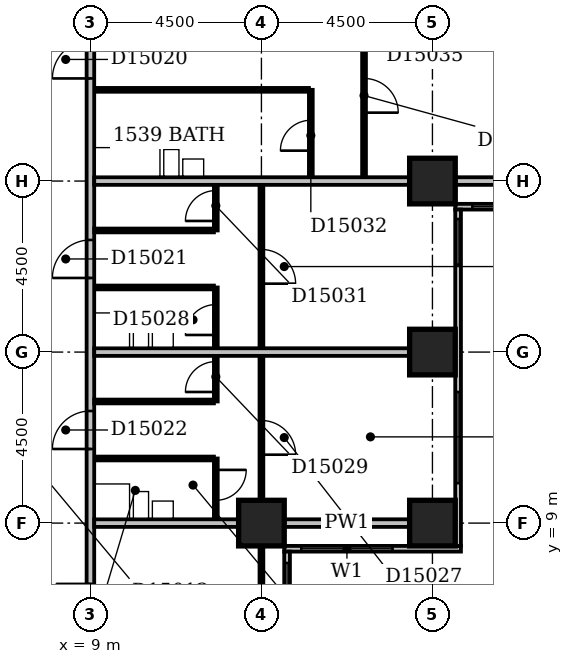
"""IFC4 building model, lengths in metres.
Left out: names, types, materials, properties, quantities, classifications, styles, units other than length and angle.
Written with IfcOpenShell. Run it as: python <this file> out.ifc"""

import sys

from ifc_helpers import new_model, si_unit, direction, frame, frame_2d, origin, origin_2d, place, context, subcontext, project, spatial, rectangle, extrude, element, fill, save


model = new_model("IFC4")
c1 = context("Model", 3, precision=1e-05, world=origin(), true_north=direction((0.0, 1.0)))
c2 = subcontext(c1, "Body", "Model", "MODEL_VIEW")
j1 = project(units=[si_unit("LENGTHUNIT", "METRE"), si_unit("PLANEANGLEUNIT", "RADIAN")], contexts=[c1])
p1 = place(None, origin())
s1 = spatial("IfcSite", under=j1, at=p1, CompositionType="ELEMENT")
p2 = place(p1, origin())
s2 = spatial("IfcBuilding", under=s1, at=p2, CompositionType="ELEMENT")
p3 = place(p2, frame((0.0, 0.0, 65.0)))
s3 = spatial("IfcBuildingStorey", under=s2, at=p3, CompositionType="ELEMENT", Elevation=65.0)
for number, where, z_axis, x_axis in (
    (1, (13.5, 9.0, -0.3), (0.0, 0.0, 1.0), (1.0, 0.0, 0.0)),
    (2, (18.0, 9.0, -0.3), (0.0, 0.0, 1.0), (1.0, 0.0, 0.0)),
    (3, (18.0, 13.5, -0.3), (0.0, 0.0, 1.0), (1.0, 0.0, 0.0)),
    (4, (18.0, 18.0, -0.3), (0.0, 0.0, 1.0), (1.0, 0.0, 0.0)),
):
    element("IfcColumn", number, at=place(p3, frame(where, z_axis=z_axis, x_axis=x_axis)), inside=s3, PredefinedType="COLUMN", context=c2, shape_type="SweptSolid", body=[
        extrude(rectangle(XDim=1.2, YDim=1.2, at=origin_2d()), origin(), (0.0, 0.0, 1.0), 3.6),
    ])
p4 = place(p3, frame((14.175, 3.9, 0.0), z_axis=(0.0, 0.0, 1.0), x_axis=(0.0, 1.0, 0.0)))
e5 = element("IfcWall", 5, at=p4, inside=s3, PredefinedType="STANDARD", context=c2, shape_type="SweptSolid", body=[
    extrude(rectangle(XDim=4.35, YDim=0.15, at=frame_2d((2.175, 0.0))), origin(), (0.0, 0.0, 1.0), 2.7),
])
p5 = place(p4, frame((1.65, 0.0, 0.6)))
e6 = element("IfcOpeningElement", 6, at=p5, cuts=e5, PredefinedType="OPENING", context=c2, shape_type="SweptSolid", body=[
    extrude(rectangle(XDim=2.4, YDim=1.8, at=frame_2d((1.2, 0.9))), frame((0.0, 0.087, 0.0), z_axis=(0.0, -1.0, 0.0), x_axis=(1.0, 0.0, 0.0)), (0.0, 0.0, 1.0), 0.174),
])
p6 = place(p3, frame((14.1, 8.325, 0.0), z_axis=(0.0, 0.0, 1.0), x_axis=(1.0, 0.0, 0.0)))
e7 = element("IfcWall", 7, at=p6, inside=s3, PredefinedType="STANDARD", context=c2, shape_type="SweptSolid", body=[
    extrude(rectangle(XDim=4.65, YDim=0.15, at=frame_2d((2.325, 0.0))), origin(), (0.0, 0.0, 1.0), 2.7),
])
p7 = place(p6, frame((0.45, 0.0, 0.6)))
e8 = element("IfcOpeningElement", 8, at=p7, cuts=e7, PredefinedType="OPENING", context=c2, shape_type="SweptSolid", body=[
    extrude(rectangle(XDim=2.4, YDim=1.8, at=frame_2d((1.2, 0.9))), frame((0.0, 0.087, 0.0), z_axis=(0.0, -1.0, 0.0), x_axis=(1.0, 0.0, 0.0)), (0.0, 0.0, 1.0), 0.174),
])
p8 = place(p3, frame((18.675, 8.4, 0.0), z_axis=(0.0, 0.0, 1.0), x_axis=(0.0, 1.0, 0.0)))
e9 = element("IfcWall", 9, at=p8, inside=s3, PredefinedType="STANDARD", context=c2, shape_type="SweptSolid", body=[
    extrude(rectangle(XDim=8.85, YDim=0.15, at=frame_2d((4.425, 0.0))), origin(), (0.0, 0.0, 1.0), 2.7),
])
p9 = place(p8, frame((1.65, 0.0, 0.6)))
e10 = element("IfcOpeningElement", 10, at=p9, cuts=e9, PredefinedType="OPENING", context=c2, shape_type="SweptSolid", body=[
    extrude(rectangle(XDim=2.4, YDim=1.8, at=frame_2d((1.2, 0.9))), frame((0.0, 0.087, 0.0), z_axis=(0.0, -1.0, 0.0), x_axis=(1.0, 0.0, 0.0)), (0.0, 0.0, 1.0), 0.174),
])
p10 = place(p8, frame((7.401, 0.0, 0.6)))
e11 = element("IfcOpeningElement", 11, at=p10, cuts=e9, PredefinedType="OPENING", context=c2, shape_type="SweptSolid", body=[
    extrude(rectangle(XDim=1.2, YDim=1.8, at=frame_2d((0.6, 0.9))), frame((0.0, 0.087, 0.0), z_axis=(0.0, -1.0, 0.0), x_axis=(1.0, 0.0, 0.0)), (0.0, 0.0, 1.0), 0.174),
])
p11 = place(p3, frame((18.6, 17.325, 0.0), z_axis=(0.0, 0.0, 1.0), x_axis=(1.0, 0.0, 0.0)))
e12 = element("IfcWall", 12, at=p11, inside=s3, PredefinedType="STANDARD", context=c2, shape_type="SweptSolid", body=[
    extrude(rectangle(XDim=4.65, YDim=0.15, at=frame_2d((2.325, 0.0))), origin(), (0.0, 0.0, 1.0), 2.7),
])
p12 = place(p11, frame((0.45, 0.0, 0.6)))
e13 = element("IfcOpeningElement", 13, at=p12, cuts=e12, PredefinedType="OPENING", context=c2, shape_type="SweptSolid", body=[
    extrude(rectangle(XDim=2.4, YDim=1.8, at=frame_2d((1.2, 0.9))), frame((0.0, 0.087, 0.0), z_axis=(0.0, -1.0, 0.0), x_axis=(1.0, 0.0, 0.0)), (0.0, 0.0, 1.0), 0.174),
])
p13 = place(p3, frame((9.0, 5.0, 0.0), z_axis=(0.0, 0.0, 1.0), x_axis=(0.0, 1.0, 0.0)))
e14 = element("IfcWall", 14, at=p13, inside=s3, PredefinedType="PARTITIONING", context=c2, shape_type="SweptSolid", body=[
    extrude(rectangle(XDim=44.5, YDim=0.2, at=frame_2d((22.25, 0.0))), origin(), (0.0, 0.0, 1.0), 3.3),
])
p14 = place(p13, frame((22.3, 0.0, 0.0)))
e15 = element("IfcOpeningElement", 15, at=p14, cuts=e14, PredefinedType="OPENING", context=c2, shape_type="SweptSolid", body=[
    extrude(rectangle(XDim=1.0, YDim=2.1, at=frame_2d((0.5, 1.05))), frame((0.0, 0.112, 0.0), z_axis=(0.0, -1.0, 0.0), x_axis=(1.0, 0.0, 0.0)), (0.0, 0.0, 1.0), 0.224),
])
p15 = place(p13, frame((15.7, 0.0, 0.0)))
e16 = element("IfcOpeningElement", 16, at=p15, cuts=e14, PredefinedType="OPENING", context=c2, shape_type="SweptSolid", body=[
    extrude(rectangle(XDim=1.0, YDim=2.1, at=frame_2d((0.5, 1.05))), frame((0.0, 0.112, 0.0), z_axis=(0.0, -1.0, 0.0), x_axis=(1.0, 0.0, 0.0)), (0.0, 0.0, 1.0), 0.224),
])
p16 = place(p13, frame((10.45, 0.0, 0.0)))
e17 = element("IfcOpeningElement", 17, at=p16, cuts=e14, PredefinedType="OPENING", context=c2, shape_type="SweptSolid", body=[
    extrude(rectangle(XDim=1.0, YDim=2.1, at=frame_2d((0.5, 1.05))), frame((0.0, 0.112, 0.0), z_axis=(0.0, -1.0, 0.0), x_axis=(1.0, 0.0, 0.0)), (0.0, 0.0, 1.0), 0.224),
])
p17 = place(p13, frame((5.95, 0.0, 0.0)))
e18 = element("IfcOpeningElement", 18, at=p17, cuts=e14, PredefinedType="OPENING", context=c2, shape_type="SweptSolid", body=[
    extrude(rectangle(XDim=1.0, YDim=2.1, at=frame_2d((0.5, 1.05))), frame((0.0, 0.112, 0.0), z_axis=(0.0, -1.0, 0.0), x_axis=(1.0, 0.0, 0.0)), (0.0, 0.0, 1.0), 0.224),
])
p18 = place(p13, frame((37.25, 0.0, 0.0)))
e19 = element("IfcOpeningElement", 19, at=p18, cuts=e14, PredefinedType="OPENING", context=c2, shape_type="SweptSolid", body=[
    extrude(rectangle(XDim=0.9, YDim=2.1, at=frame_2d((0.45, 1.05))), frame((0.0, 0.112, 0.0), z_axis=(0.0, -1.0, 0.0), x_axis=(1.0, 0.0, 0.0)), (0.0, 0.0, 1.0), 0.224),
])
p19 = place(p13, frame((1.5, 0.0, 0.0)))
e20 = element("IfcOpeningElement", 20, at=p19, cuts=e14, PredefinedType="OPENING", context=c2, shape_type="SweptSolid", body=[
    extrude(rectangle(XDim=0.9, YDim=2.1, at=frame_2d((0.45, 1.05))), frame((0.0, 0.112, 0.0), z_axis=(0.0, -1.0, 0.0), x_axis=(1.0, 0.0, 0.0)), (0.0, 0.0, 1.0), 0.224),
])
p20 = place(p3, frame((13.5, 5.1, 0.0), z_axis=(0.0, 0.0, 1.0), x_axis=(0.0, 1.0, 0.0)))
e21 = element("IfcWall", 21, at=p20, inside=s3, PredefinedType="PARTITIONING", context=c2, shape_type="SweptSolid", body=[
    extrude(rectangle(XDim=3.3, YDim=0.1, at=frame_2d((1.65, 0.0))), origin(), (0.0, 0.0, 1.0), 2.7),
])
p21 = place(p3, frame((9.1, 9.0, 0.0), z_axis=(0.0, 0.0, 1.0), x_axis=(1.0, 0.0, 0.0)))
e22 = element("IfcWall", 22, at=p21, inside=s3, PredefinedType="PARTITIONING", context=c2, shape_type="SweptSolid", body=[
    extrude(rectangle(XDim=3.8, YDim=0.2, at=frame_2d((1.9, 0.0))), origin(), (0.0, 0.0, 1.0), 3.3),
])
p22 = place(p3, frame((14.1, 9.0, 0.0), z_axis=(0.0, 0.0, 1.0), x_axis=(1.0, 0.0, 0.0)))
e23 = element("IfcWall", 23, at=p22, inside=s3, PredefinedType="PARTITIONING", context=c2, shape_type="SweptSolid", body=[
    extrude(rectangle(XDim=3.3, YDim=0.2, at=frame_2d((1.65, 0.0))), origin(), (0.0, 0.0, 1.0), 2.7),
])
p23 = place(p3, frame((12.3, 9.1, 0.0), z_axis=(0.0, 0.0, 1.0), x_axis=(0.0, 1.0, 0.0)))
e24 = element("IfcWall", 24, at=p23, inside=s3, PredefinedType="PARTITIONING", context=c2, shape_type="SweptSolid", body=[
    extrude(rectangle(XDim=1.6, YDim=0.1, at=frame_2d((0.8, 0.0))), origin(), (0.0, 0.0, 1.0), 3.3),
])
p24 = place(p23, frame((0.5, 0.0, 0.0)))
e25 = element("IfcOpeningElement", 25, at=p24, cuts=e24, PredefinedType="OPENING", context=c2, shape_type="SweptSolid", body=[
    extrude(rectangle(XDim=0.8, YDim=2.1, at=frame_2d((0.4, 1.05))), frame((0.0, 0.062, 0.0), z_axis=(0.0, -1.0, 0.0), x_axis=(1.0, 0.0, 0.0)), (0.0, 0.0, 1.0), 0.124),
])
p25 = place(p3, frame((13.5, 9.6, 0.0), z_axis=(0.0, 0.0, 1.0), x_axis=(0.0, 1.0, 0.0)))
e26 = element("IfcWall", 26, at=p25, inside=s3, PredefinedType="PARTITIONING", context=c2, shape_type="SweptSolid", body=[
    extrude(rectangle(XDim=8.3, YDim=0.1, at=frame_2d((4.15, 0.0))), origin(), (0.0, 0.0, 1.0), 3.3),
])
p26 = place(p25, frame((5.7, 0.0, 0.0)))
e27 = element("IfcOpeningElement", 27, at=p26, cuts=e26, PredefinedType="OPENING", context=c2, shape_type="SweptSolid", body=[
    extrude(rectangle(XDim=0.9, YDim=2.1, at=frame_2d((0.45, 1.05))), frame((0.0, 0.062, 0.0), z_axis=(0.0, -1.0, 0.0), x_axis=(1.0, 0.0, 0.0)), (0.0, 0.0, 1.0), 0.124),
])
p27 = place(p25, frame((1.2, 0.0, 0.0)))
e28 = element("IfcOpeningElement", 28, at=p27, cuts=e26, PredefinedType="OPENING", context=c2, shape_type="SweptSolid", body=[
    extrude(rectangle(XDim=0.9, YDim=2.1, at=frame_2d((0.45, 1.05))), frame((0.0, 0.062, 0.0), z_axis=(0.0, -1.0, 0.0), x_axis=(1.0, 0.0, 0.0)), (0.0, 0.0, 1.0), 0.124),
])
p28 = place(p3, frame((9.1, 10.7, 0.0), z_axis=(0.0, 0.0, 1.0), x_axis=(1.0, 0.0, 0.0)))
e29 = element("IfcWall", 29, at=p28, inside=s3, PredefinedType="PLUMBINGWALL", context=c2, shape_type="SweptSolid", body=[
    extrude(rectangle(XDim=3.15, YDim=0.1, at=frame_2d((1.575, 0.0))), origin(), (0.0, 0.0, 1.0), 3.3),
])
p29 = place(p3, frame((9.1, 12.2, 0.0), z_axis=(0.0, 0.0, 1.0), x_axis=(1.0, 0.0, 0.0)))
e30 = element("IfcWall", 30, at=p29, inside=s3, PredefinedType="PARTITIONING", context=c2, shape_type="SweptSolid", body=[
    extrude(rectangle(XDim=3.15, YDim=0.1, at=frame_2d((1.575, 0.0))), origin(), (0.0, 0.0, 1.0), 3.3),
])
p30 = place(p3, frame((12.3, 12.2, 0.0), z_axis=(0.0, 0.0, 1.0), x_axis=(0.0, 1.0, 0.0)))
e31 = element("IfcWall", 31, at=p30, inside=s3, PredefinedType="PARTITIONING", context=c2, shape_type="SweptSolid", body=[
    extrude(rectangle(XDim=3.0, YDim=0.1, at=frame_2d((1.5, 0.0))), origin(), (0.0, 0.0, 1.0), 3.3),
])
p31 = place(p30, frame((1.75, 0.0, 0.0)))
e32 = element("IfcOpeningElement", 32, at=p31, cuts=e31, PredefinedType="OPENING", context=c2, shape_type="SweptSolid", body=[
    extrude(rectangle(XDim=0.8, YDim=2.1, at=frame_2d((0.4, 1.05))), frame((0.0, 0.062, 0.0), z_axis=(0.0, -1.0, 0.0), x_axis=(1.0, 0.0, 0.0)), (0.0, 0.0, 1.0), 0.124),
])
p32 = place(p30, frame((0.25, 0.0, 0.0)))
e33 = element("IfcOpeningElement", 33, at=p32, cuts=e31, PredefinedType="OPENING", context=c2, shape_type="SweptSolid", body=[
    extrude(rectangle(XDim=0.8, YDim=2.1, at=frame_2d((0.4, 1.05))), frame((0.0, 0.062, 0.0), z_axis=(0.0, -1.0, 0.0), x_axis=(1.0, 0.0, 0.0)), (0.0, 0.0, 1.0), 0.124),
])
p33 = place(p3, frame((9.1, 13.5, 0.0), z_axis=(0.0, 0.0, 1.0), x_axis=(1.0, 0.0, 0.0)))
e34 = element("IfcWall", 34, at=p33, inside=s3, PredefinedType="PARTITIONING", context=c2, shape_type="SweptSolid", body=[
    extrude(rectangle(XDim=8.3, YDim=0.2, at=frame_2d((4.15, 0.0))), origin(), (0.0, 0.0, 1.0), 3.3),
])
p34 = place(p3, frame((9.1, 15.2, 0.0), z_axis=(0.0, 0.0, 1.0), x_axis=(1.0, 0.0, 0.0)))
e35 = element("IfcWall", 35, at=p34, inside=s3, PredefinedType="PLUMBINGWALL", context=c2, shape_type="SweptSolid", body=[
    extrude(rectangle(XDim=3.15, YDim=0.1, at=frame_2d((1.575, 0.0))), origin(), (0.0, 0.0, 1.0), 3.3),
])
p35 = place(p3, frame((9.1, 16.7, 0.0), z_axis=(0.0, 0.0, 1.0), x_axis=(1.0, 0.0, 0.0)))
e36 = element("IfcWall", 36, at=p35, inside=s3, PredefinedType="PARTITIONING", context=c2, shape_type="SweptSolid", body=[
    extrude(rectangle(XDim=3.15, YDim=0.1, at=frame_2d((1.575, 0.0))), origin(), (0.0, 0.0, 1.0), 3.3),
])
p36 = place(p3, frame((12.3, 16.7, 0.0), z_axis=(0.0, 0.0, 1.0), x_axis=(0.0, 1.0, 0.0)))
e37 = element("IfcWall", 37, at=p36, inside=s3, PredefinedType="PARTITIONING", context=c2, shape_type="SweptSolid", body=[
    extrude(rectangle(XDim=1.2, YDim=0.1, at=frame_2d((0.6, 0.0))), origin(), (0.0, 0.0, 1.0), 3.3),
])
p37 = place(p36, frame((0.25, 0.0, 0.0)))
e38 = element("IfcOpeningElement", 38, at=p37, cuts=e37, PredefinedType="OPENING", context=c2, shape_type="SweptSolid", body=[
    extrude(rectangle(XDim=0.8, YDim=2.1, at=frame_2d((0.4, 1.05))), frame((0.0, 0.062, 0.0), z_axis=(0.0, -1.0, 0.0), x_axis=(1.0, 0.0, 0.0)), (0.0, 0.0, 1.0), 0.124),
])
p38 = place(p3, frame((9.1, 18.0, 0.0), z_axis=(0.0, 0.0, 1.0), x_axis=(1.0, 0.0, 0.0)))
e39 = element("IfcWall", 39, at=p38, inside=s3, PredefinedType="PARTITIONING", context=c2, shape_type="SweptSolid", body=[
    extrude(rectangle(XDim=8.3, YDim=0.2, at=frame_2d((4.15, 0.0))), origin(), (0.0, 0.0, 1.0), 2.6),
])
p39 = place(p3, frame((18.6, 18.0, 0.0), z_axis=(0.0, 0.0, 1.0), x_axis=(1.0, 0.0, 0.0)))
e40 = element("IfcWall", 40, at=p39, inside=s3, PredefinedType="PARTITIONING", context=c2, shape_type="SweptSolid", body=[
    extrude(rectangle(XDim=3.3, YDim=0.2, at=frame_2d((1.65, 0.0))), origin(), (0.0, 0.0, 1.0), 2.7),
])
p40 = place(p3, frame((14.8, 18.1, 0.0), z_axis=(0.0, 0.0, 1.0), x_axis=(0.0, 1.0, 0.0)))
e41 = element("IfcWall", 41, at=p40, inside=s3, PredefinedType="PARTITIONING", context=c2, shape_type="SweptSolid", body=[
    extrude(rectangle(XDim=2.3, YDim=0.1, at=frame_2d((1.15, 0.0))), origin(), (0.0, 0.0, 1.0), 3.3),
])
p41 = place(p40, frame((0.7, 0.0, 0.0)))
e42 = element("IfcOpeningElement", 42, at=p41, cuts=e41, PredefinedType="OPENING", context=c2, shape_type="SweptSolid", body=[
    extrude(rectangle(XDim=0.8, YDim=2.1, at=frame_2d((0.4, 1.05))), frame((0.0, 0.062, 0.0), z_axis=(0.0, -1.0, 0.0), x_axis=(1.0, 0.0, 0.0)), (0.0, 0.0, 1.0), 0.124),
])
p42 = place(p3, frame((16.2, 18.1, 0.0), z_axis=(0.0, 0.0, 1.0), x_axis=(0.0, 1.0, 0.0)))
e43 = element("IfcWall", 43, at=p42, inside=s3, PredefinedType="PARTITIONING", context=c2, shape_type="SweptSolid", body=[
    extrude(rectangle(XDim=8.8, YDim=0.1, at=frame_2d((4.4, 0.0))), origin(), (0.0, 0.0, 1.0), 3.3),
])
p43 = place(p42, frame((1.7, 0.0, 0.0)))
e44 = element("IfcOpeningElement", 44, at=p43, cuts=e43, PredefinedType="OPENING", context=c2, shape_type="SweptSolid", body=[
    extrude(rectangle(XDim=0.9, YDim=2.1, at=frame_2d((0.45, 1.05))), frame((0.0, 0.062, 0.0), z_axis=(0.0, -1.0, 0.0), x_axis=(1.0, 0.0, 0.0)), (0.0, 0.0, 1.0), 0.124),
])
p44 = place(p42, frame((6.2, 0.0, 0.0)))
e45 = element("IfcOpeningElement", 45, at=p44, cuts=e43, PredefinedType="OPENING", context=c2, shape_type="SweptSolid", body=[
    extrude(rectangle(XDim=0.9, YDim=2.1, at=frame_2d((0.45, 1.05))), frame((0.0, 0.062, 0.0), z_axis=(0.0, -1.0, 0.0), x_axis=(1.0, 0.0, 0.0)), (0.0, 0.0, 1.0), 0.124),
])
p45 = place(p3, frame((9.1, 20.4, 0.0), z_axis=(0.0, 0.0, 1.0), x_axis=(1.0, 0.0, 0.0)))
e46 = element("IfcWall", 46, at=p45, inside=s3, PredefinedType="PLUMBINGWALL", context=c2, shape_type="SweptSolid", body=[
    extrude(rectangle(XDim=5.65, YDim=0.1, at=frame_2d((2.825, 0.0))), origin(), (0.0, 0.0, 1.0), 3.3),
])
p46 = place(p5, origin())
e47 = element("IfcWindow", 47, at=p46, inside=s3, PartitioningType="SINGLE_PANEL", PredefinedType="WINDOW", context=c2, shape_type="SweptSolid", body=[
    extrude(rectangle(XDim=2.4, YDim=1.8, at=frame_2d((1.2, 0.9))), frame((0.0, 0.03, 0.0), z_axis=(0.0, -1.0, 0.0), x_axis=(1.0, 0.0, 0.0)), (0.0, 0.0, 1.0), 0.06),
])
fill(e6, e47)
p47 = place(p7, origin())
e48 = element("IfcWindow", 48, at=p47, inside=s3, PartitioningType="SINGLE_PANEL", PredefinedType="WINDOW", context=c2, shape_type="SweptSolid", body=[
    extrude(rectangle(XDim=2.4, YDim=1.8, at=frame_2d((1.2, 0.9))), frame((0.0, 0.03, 0.0), z_axis=(0.0, -1.0, 0.0), x_axis=(1.0, 0.0, 0.0)), (0.0, 0.0, 1.0), 0.06),
])
fill(e8, e48)
p48 = place(p9, origin())
e49 = element("IfcWindow", 49, at=p48, inside=s3, PartitioningType="SINGLE_PANEL", PredefinedType="WINDOW", context=c2, shape_type="SweptSolid", body=[
    extrude(rectangle(XDim=2.4, YDim=1.8, at=frame_2d((1.2, 0.9))), frame((0.0, 0.03, 0.0), z_axis=(0.0, -1.0, 0.0), x_axis=(1.0, 0.0, 0.0)), (0.0, 0.0, 1.0), 0.06),
])
fill(e10, e49)
p49 = place(p10, origin())
e50 = element("IfcWindow", 50, at=p49, inside=s3, PartitioningType="SINGLE_PANEL", PredefinedType="WINDOW", context=c2, shape_type="SweptSolid", body=[
    extrude(rectangle(XDim=1.2, YDim=1.8, at=frame_2d((0.6, 0.9))), frame((0.0, 0.03, 0.0), z_axis=(0.0, -1.0, 0.0), x_axis=(1.0, 0.0, 0.0)), (0.0, 0.0, 1.0), 0.06),
])
fill(e11, e50)
p50 = place(p12, origin())
e51 = element("IfcWindow", 51, at=p50, inside=s3, PartitioningType="SINGLE_PANEL", PredefinedType="WINDOW", context=c2, shape_type="SweptSolid", body=[
    extrude(rectangle(XDim=2.4, YDim=1.8, at=frame_2d((1.2, 0.9))), frame((0.0, 0.03, 0.0), z_axis=(0.0, -1.0, 0.0), x_axis=(1.0, 0.0, 0.0)), (0.0, 0.0, 1.0), 0.06),
])
fill(e13, e51)
p51 = place(p15, origin())
e52 = element("IfcDoor", 52, at=p51, inside=s3, OperationType="SINGLE_SWING_LEFT", PredefinedType="DOOR", context=c2, shape_type="SweptSolid", body=[
    extrude(rectangle(XDim=1.0, YDim=2.1, at=frame_2d((0.5, 1.05))), frame((0.0, 0.025, 0.0), z_axis=(0.0, -1.0, 0.0), x_axis=(1.0, 0.0, 0.0)), (0.0, 0.0, 1.0), 0.05),
])
fill(e16, e52)
p52 = place(p16, origin())
e53 = element("IfcDoor", 53, at=p52, inside=s3, OperationType="SINGLE_SWING_LEFT", PredefinedType="DOOR", context=c2, shape_type="SweptSolid", body=[
    extrude(rectangle(XDim=1.0, YDim=2.1, at=frame_2d((0.5, 1.05))), frame((0.0, 0.025, 0.0), z_axis=(0.0, -1.0, 0.0), x_axis=(1.0, 0.0, 0.0)), (0.0, 0.0, 1.0), 0.05),
])
fill(e17, e53)
p53 = place(p17, origin())
e54 = element("IfcDoor", 54, at=p53, inside=s3, OperationType="SINGLE_SWING_LEFT", PredefinedType="DOOR", context=c2, shape_type="SweptSolid", body=[
    extrude(rectangle(XDim=1.0, YDim=2.1, at=frame_2d((0.5, 1.05))), frame((0.0, 0.025, 0.0), z_axis=(0.0, -1.0, 0.0), x_axis=(1.0, 0.0, 0.0)), (0.0, 0.0, 1.0), 0.05),
])
fill(e18, e54)
p54 = place(p24, origin())
e55 = element("IfcDoor", 55, at=p54, inside=s3, OperationType="SINGLE_SWING_RIGHT", PredefinedType="DOOR", context=c2, shape_type="SweptSolid", body=[
    extrude(rectangle(XDim=0.8, YDim=2.1, at=frame_2d((0.4, 1.05))), frame((0.0, 0.025, 0.0), z_axis=(0.0, -1.0, 0.0), x_axis=(1.0, 0.0, 0.0)), (0.0, 0.0, 1.0), 0.05),
])
fill(e25, e55)
p55 = place(p26, frame((0.9, 0.0, 0.0), z_axis=(0.0, 0.0, 1.0), x_axis=(-1.0, 0.0, 0.0)))
e56 = element("IfcDoor", 56, at=p55, inside=s3, OperationType="SINGLE_SWING_RIGHT", PredefinedType="DOOR", context=c2, shape_type="SweptSolid", body=[
    extrude(rectangle(XDim=0.9, YDim=2.1, at=frame_2d((0.45, 1.05))), frame((0.0, 0.025, 0.0), z_axis=(0.0, -1.0, 0.0), x_axis=(1.0, 0.0, 0.0)), (0.0, 0.0, 1.0), 0.05),
])
fill(e27, e56)
p56 = place(p27, frame((0.9, 0.0, 0.0), z_axis=(0.0, 0.0, 1.0), x_axis=(-1.0, 0.0, 0.0)))
e57 = element("IfcDoor", 57, at=p56, inside=s3, OperationType="SINGLE_SWING_RIGHT", PredefinedType="DOOR", context=c2, shape_type="SweptSolid", body=[
    extrude(rectangle(XDim=0.9, YDim=2.1, at=frame_2d((0.45, 1.05))), frame((0.0, 0.025, 0.0), z_axis=(0.0, -1.0, 0.0), x_axis=(1.0, 0.0, 0.0)), (0.0, 0.0, 1.0), 0.05),
])
fill(e28, e57)
p57 = place(p31, origin())
e58 = element("IfcDoor", 58, at=p57, inside=s3, OperationType="SINGLE_SWING_LEFT", PredefinedType="DOOR", context=c2, shape_type="SweptSolid", body=[
    extrude(rectangle(XDim=0.8, YDim=2.1, at=frame_2d((0.4, 1.05))), frame((0.0, 0.025, 0.0), z_axis=(0.0, -1.0, 0.0), x_axis=(1.0, 0.0, 0.0)), (0.0, 0.0, 1.0), 0.05),
])
fill(e32, e58)
p58 = place(p32, origin())
e59 = element("IfcDoor", 59, at=p58, inside=s3, OperationType="SINGLE_SWING_LEFT", PredefinedType="DOOR", context=c2, shape_type="SweptSolid", body=[
    extrude(rectangle(XDim=0.8, YDim=2.1, at=frame_2d((0.4, 1.05))), frame((0.0, 0.025, 0.0), z_axis=(0.0, -1.0, 0.0), x_axis=(1.0, 0.0, 0.0)), (0.0, 0.0, 1.0), 0.05),
])
fill(e33, e59)
p59 = place(p37, origin())
e60 = element("IfcDoor", 60, at=p59, inside=s3, OperationType="SINGLE_SWING_LEFT", PredefinedType="DOOR", context=c2, shape_type="SweptSolid", body=[
    extrude(rectangle(XDim=0.8, YDim=2.1, at=frame_2d((0.4, 1.05))), frame((0.0, 0.025, 0.0), z_axis=(0.0, -1.0, 0.0), x_axis=(1.0, 0.0, 0.0)), (0.0, 0.0, 1.0), 0.05),
])
fill(e38, e60)
p60 = place(p41, origin())
e61 = element("IfcDoor", 61, at=p60, inside=s3, OperationType="SINGLE_SWING_LEFT", PredefinedType="DOOR", context=c2, shape_type="SweptSolid", body=[
    extrude(rectangle(XDim=0.8, YDim=2.1, at=frame_2d((0.4, 1.05))), frame((0.0, 0.025, 0.0), z_axis=(0.0, -1.0, 0.0), x_axis=(1.0, 0.0, 0.0)), (0.0, 0.0, 1.0), 0.05),
])
fill(e42, e61)
p61 = place(p43, frame((0.9, 0.0, 0.0), z_axis=(0.0, 0.0, 1.0), x_axis=(-1.0, 0.0, 0.0)))
e62 = element("IfcDoor", 62, at=p61, inside=s3, OperationType="SINGLE_SWING_RIGHT", PredefinedType="DOOR", context=c2, shape_type="SweptSolid", body=[
    extrude(rectangle(XDim=0.9, YDim=2.1, at=frame_2d((0.45, 1.05))), frame((0.0, 0.025, 0.0), z_axis=(0.0, -1.0, 0.0), x_axis=(1.0, 0.0, 0.0)), (0.0, 0.0, 1.0), 0.05),
])
fill(e44, e62)
save(model, sys.argv[1])
